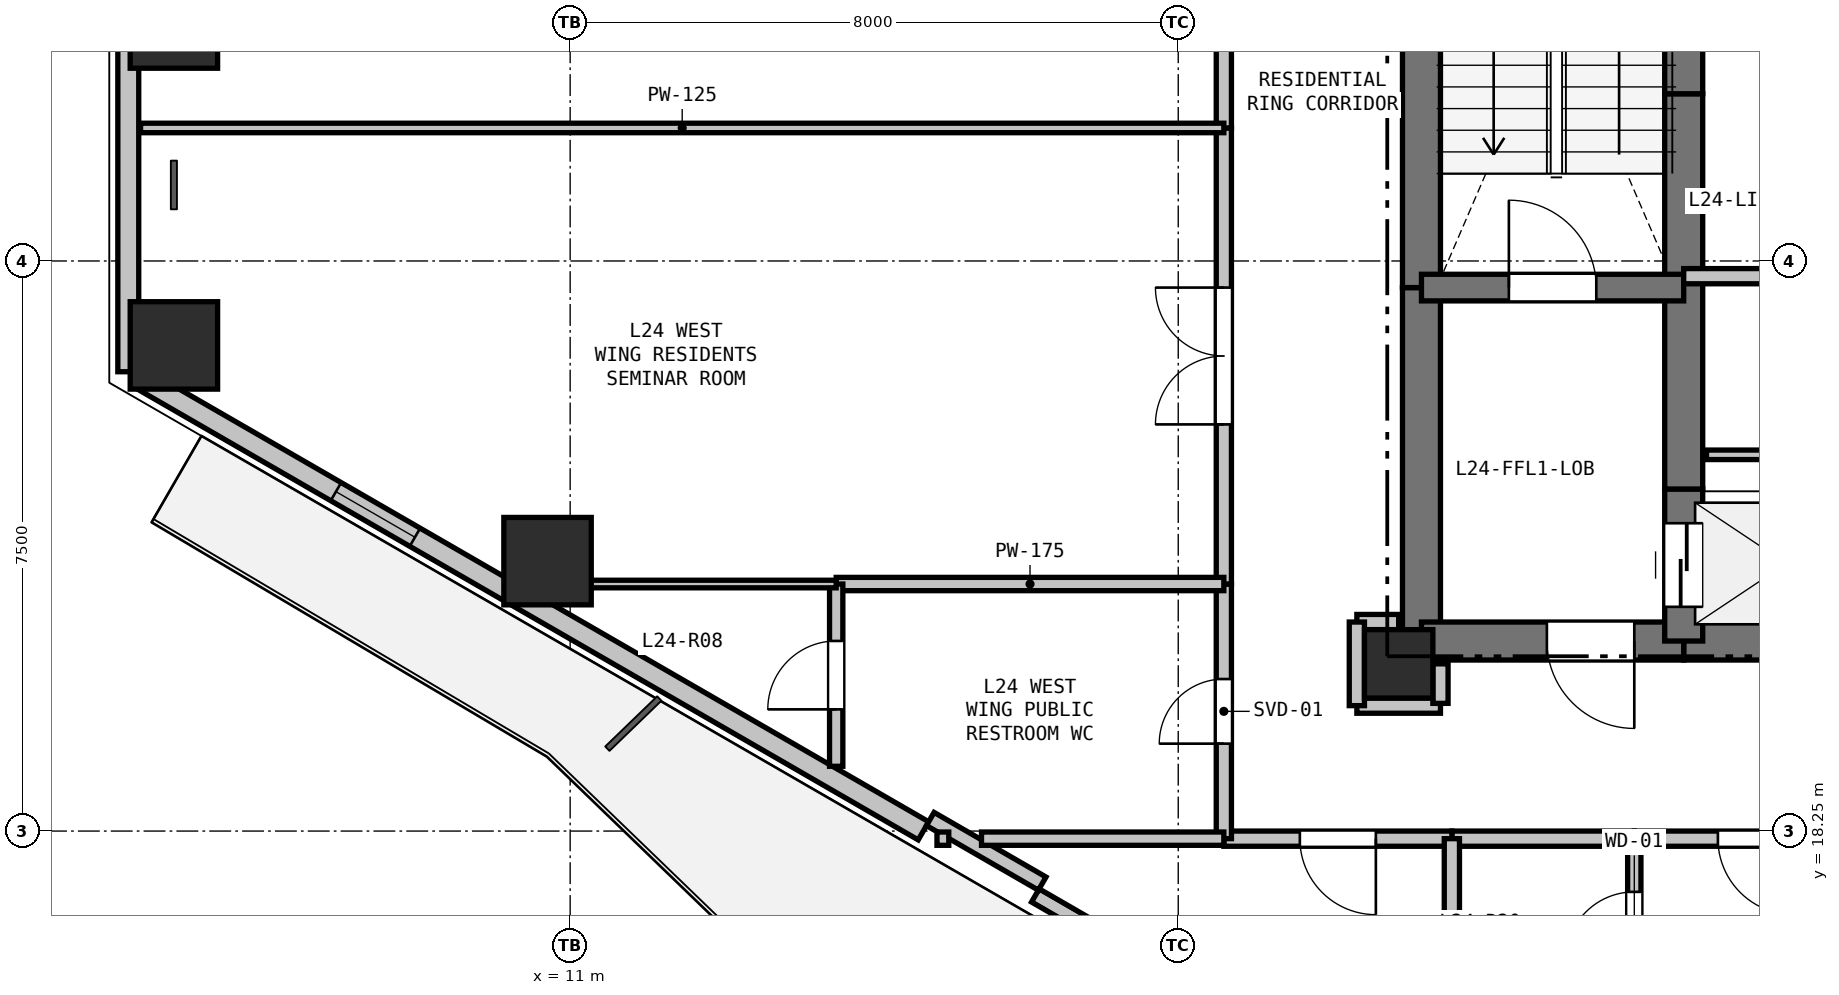
"""IFC4 building model, lengths in metres.
Left out: names, types, materials, properties, quantities, classifications, styles, units other than length and angle.
Written with IfcOpenShell. Run it as: python <this file> out.ifc"""

import sys

from ifc_helpers import new_model, si_unit, direction, frame, frame_2d, origin, origin_2d, place, context, subcontext, project, spatial, rectangle, hollow_rectangle, extrude, element, fill, save


model = new_model("IFC4")
c1 = context("Model", 3, precision=1e-05, world=origin(), true_north=direction((0.0, 1.0)))
c2 = subcontext(c1, "Body", "Model", "MODEL_VIEW")
j1 = project(units=[si_unit("LENGTHUNIT", "METRE"), si_unit("PLANEANGLEUNIT", "RADIAN")], contexts=[c1])
p1 = place(None, origin())
s1 = spatial("IfcSite", under=j1, at=p1, CompositionType="ELEMENT")
p2 = place(p1, origin())
s2 = spatial("IfcBuilding", under=s1, at=p2, CompositionType="ELEMENT")
p3 = place(p2, frame((0.0, 0.0, 90.0)))
s3 = spatial("IfcBuildingStorey", under=s2, at=p3, CompositionType="ELEMENT", Elevation=90.0)
p4 = place(p3, frame((21.9, 20.45, 0.0), z_axis=(0.0, 0.0, 1.0), x_axis=(1.0, 0.0, 0.0)))
e1 = element("IfcColumn", 1, at=p4, inside=s3, PredefinedType="COLUMN", context=c2, shape_type="SweptSolid", body=[
    extrude(rectangle(XDim=0.9, YDim=0.9, at=origin_2d()), origin(), (0.0, 0.0, 1.0), 3.3),
])
for number, where, z_axis, x_axis in (
    (2, (5.787, 28.861, 0.0), (0.0, 0.0, 1.0), (1.0, 0.0, 0.0)),
    (3, (10.702, 21.801, 0.0), (0.0, 0.0, 1.0), (1.0, 0.0, 0.0)),
    (4, (5.787, 24.639, 0.0), (0.0, 0.0, 1.0), (1.0, 0.0, 0.0)),
):
    element("IfcColumn", number, at=place(p3, frame(where, z_axis=z_axis, x_axis=x_axis)), inside=s3, PredefinedType="COLUMN", context=c2, shape_type="SweptSolid", body=[
        extrude(hollow_rectangle(XDim=1.15, YDim=1.15, WallThickness=0.032, at=origin_2d()), origin(), (0.0, 0.0, 1.0), 3.3),
    ])
p5 = place(p3, frame((5.187, 24.293, 0.0), z_axis=(0.0, 0.0, 1.0), x_axis=(0.0, 1.0, 0.0)))
e5 = element("IfcWall", 5, at=p5, inside=s3, PredefinedType="SOLIDWALL", context=c2, shape_type="SweptSolid", body=[
    extrude(rectangle(XDim=4.915, YDim=0.275, at=frame_2d((2.457, 0.0))), origin(), (0.0, 0.0, 1.0), 2.67),
])
p6 = place(p3, frame((26.845, 11.788, 0.0), z_axis=(0.0, 0.0, 1.0), x_axis=(-0.866027010039, 0.499997217876, 0.0)))
e6 = element("IfcWall", 6, at=p6, inside=s3, PredefinedType="PARAPET", context=c2, shape_type="SweptSolid", body=[
    extrude(rectangle(XDim=11.229, YDim=0.2, at=frame_2d((5.615, 0.0))), origin(), (0.0, 0.0, 1.0), 0.2),
])
p7 = place(p3, frame((15.648, 18.253, 0.0), z_axis=(0.0, 0.0, 1.0), x_axis=(-0.866023023012, 0.500004123596, 0.0)))
e7 = element("IfcWall", 7, at=p7, inside=s3, PredefinedType="SOLIDWALL", context=c2, shape_type="SweptSolid", body=[
    extrude(rectangle(XDim=11.93, YDim=0.275, at=frame_2d((5.965, 0.0))), origin(), (0.0, 0.0, 1.0), 2.67),
])
p8 = place(p7, frame((7.725, 0.0, 0.9)))
e8 = element("IfcOpeningElement", 8, at=p8, cuts=e7, PredefinedType="OPENING", context=c2, shape_type="SweptSolid", body=[
    extrude(rectangle(XDim=1.2, YDim=1.5, at=frame_2d((0.6, 0.75))), frame((0.0, 0.147, 0.0), z_axis=(0.0, -1.0, 0.0), x_axis=(1.0, 0.0, 0.0)), (0.0, 0.0, 1.0), 0.295),
])
p9 = place(p3, frame((17.21, 17.559, 0.0), z_axis=(0.0, 0.0, 1.0), x_axis=(-0.866025371046, 0.500000056704, 0.0)))
e9 = element("IfcWall", 9, at=p9, inside=s3, PredefinedType="PARAPET", context=c2, shape_type="SweptSolid", body=[
    extrude(rectangle(XDim=1.7, YDim=0.2, at=frame_2d((0.85, 0.0))), origin(), (0.0, 0.0, 1.0), 2.67),
])
p10 = place(p3, frame((22.2, 20.75, 0.0), z_axis=(0.0, 0.0, 1.0), x_axis=(0.0, 1.0, 0.0)))
e10 = element("IfcWall", 10, at=p10, inside=s3, PredefinedType="SHEAR", context=c2, shape_type="SweptSolid", body=[
    extrude(rectangle(XDim=4.65, YDim=0.5, at=frame_2d((2.325, 0.0))), origin(), (0.0, 0.0, 1.0), 3.05),
])
p11 = place(p3, frame((22.2, 25.4, 0.0), z_axis=(0.0, 0.0, 1.0), x_axis=(0.0, 1.0, 0.0)))
e11 = element("IfcWall", 11, at=p11, inside=s3, PredefinedType="SHEAR", context=c2, shape_type="SweptSolid", body=[
    extrude(rectangle(XDim=7.35, YDim=0.5, at=frame_2d((3.675, 0.0))), origin(), (0.0, 0.0, 1.0), 3.05),
])
p12 = place(p3, frame((28.35, 20.75, 0.0), z_axis=(0.0, 0.0, 1.0), x_axis=(-1.0, 0.0, 0.0)))
e12 = element("IfcWall", 12, at=p12, inside=s3, PredefinedType="SHEAR", context=c2, shape_type="SweptSolid", body=[
    extrude(rectangle(XDim=2.7, YDim=0.5, at=frame_2d((1.35, 0.0))), origin(), (0.0, 0.0, 1.0), 3.05),
])
p13 = place(p3, frame((25.65, 20.75, 0.0), z_axis=(0.0, 0.0, 1.0), x_axis=(-1.0, 0.0, 0.0)))
e13 = element("IfcWall", 13, at=p13, inside=s3, PredefinedType="SHEAR", context=c2, shape_type="SweptSolid", body=[
    extrude(rectangle(XDim=3.45, YDim=0.5, at=frame_2d((1.725, 0.0))), origin(), (0.0, 0.0, 1.0), 3.05),
])
p14 = place(p13, frame((0.65, 0.0, 0.0)))
e14 = element("IfcOpeningElement", 14, at=p14, cuts=e13, PredefinedType="OPENING", context=c2, shape_type="SweptSolid", body=[
    extrude(rectangle(XDim=1.15, YDim=2.15, at=frame_2d((0.575, 1.075))), frame((0.0, 0.26, 0.0), z_axis=(0.0, -1.0, 0.0), x_axis=(1.0, 0.0, 0.0)), (0.0, 0.0, 1.0), 0.52),
])
p15 = place(p3, frame((25.65, 20.75, 0.0), z_axis=(0.0, 0.0, 1.0), x_axis=(0.0, 1.0, 0.0)))
e15 = element("IfcWall", 15, at=p15, inside=s3, PredefinedType="SHEAR", context=c2, shape_type="SweptSolid", body=[
    extrude(rectangle(XDim=2.0, YDim=0.5, at=frame_2d((1.0, 0.0))), origin(), (0.0, 0.0, 1.0), 3.05),
])
p16 = place(p15, frame((0.45, 0.0, 0.0)))
e16 = element("IfcOpeningElement", 16, at=p16, cuts=e15, PredefinedType="OPENING", context=c2, shape_type="SweptSolid", body=[
    extrude(rectangle(XDim=1.1, YDim=2.15, at=frame_2d((0.55, 1.075))), frame((0.0, 0.26, 0.0), z_axis=(0.0, -1.0, 0.0), x_axis=(1.0, 0.0, 0.0)), (0.0, 0.0, 1.0), 0.52),
])
p17 = place(p3, frame((25.65, 22.75, 0.0), z_axis=(0.0, 0.0, 1.0), x_axis=(0.0, 1.0, 0.0)))
e17 = element("IfcWall", 17, at=p17, inside=s3, PredefinedType="SHEAR", context=c2, shape_type="SweptSolid", body=[
    extrude(rectangle(XDim=2.8, YDim=0.5, at=frame_2d((1.4, 0.0))), origin(), (0.0, 0.0, 1.0), 3.05),
])
p18 = place(p3, frame((25.65, 25.55, 0.0), z_axis=(0.0, 0.0, 1.0), x_axis=(0.0, 1.0, 0.0)))
e18 = element("IfcWall", 18, at=p18, inside=s3, PredefinedType="SHEAR", context=c2, shape_type="SweptSolid", body=[
    extrude(rectangle(XDim=2.4, YDim=0.5, at=frame_2d((1.2, 0.0))), origin(), (0.0, 0.0, 1.0), 3.05),
])
p19 = place(p3, frame((25.65, 27.95, 0.0), z_axis=(0.0, 0.0, 1.0), x_axis=(0.0, 1.0, 0.0)))
e19 = element("IfcWall", 19, at=p19, inside=s3, PredefinedType="SHEAR", context=c2, shape_type="SweptSolid", body=[
    extrude(rectangle(XDim=4.8, YDim=0.5, at=frame_2d((2.4, 0.0))), origin(), (0.0, 0.0, 1.0), 3.05),
])
p20 = place(p3, frame((22.2, 25.4, 0.0), z_axis=(0.0, 0.0, 1.0), x_axis=(1.0, 0.0, 0.0)))
e20 = element("IfcWall", 20, at=p20, inside=s3, PredefinedType="SHEAR", context=c2, shape_type="SweptSolid", body=[
    extrude(rectangle(XDim=3.45, YDim=0.35, at=frame_2d((1.725, 0.0))), origin(), (0.0, 0.0, 1.0), 3.05),
])
p21 = place(p20, frame((1.15, 0.0, 0.0)))
e21 = element("IfcOpeningElement", 21, at=p21, cuts=e20, PredefinedType="OPENING", context=c2, shape_type="SweptSolid", body=[
    extrude(rectangle(XDim=1.15, YDim=2.15, at=frame_2d((0.575, 1.075))), frame((0.0, 0.185, 0.0), z_axis=(0.0, -1.0, 0.0), x_axis=(1.0, 0.0, 0.0)), (0.0, 0.0, 1.0), 0.37),
])
p22 = place(p3, frame((25.65, 25.55, 0.0), z_axis=(0.0, 0.0, 1.0), x_axis=(1.0, 0.0, 0.0)))
e22 = element("IfcWall", 22, at=p22, inside=s3, PredefinedType="PARTITIONING", context=c2, shape_type="SweptSolid", body=[
    extrude(rectangle(XDim=4.95, YDim=0.2, at=frame_2d((2.475, 0.0))), origin(), (0.0, 0.0, 1.0), 3.05),
])
p23 = place(p3, frame((25.95, 23.2, 0.0), z_axis=(0.0, 0.0, 1.0), x_axis=(1.0, 0.0, 0.0)))
e23 = element("IfcWall", 23, at=p23, inside=s3, PredefinedType="PARTITIONING", context=c2, shape_type="SweptSolid", body=[
    extrude(rectangle(XDim=1.35, YDim=0.125, at=frame_2d((0.675, 0.0))), origin(), (0.0, 0.0, 1.0), 3.05),
])
p24 = place(p3, frame((21.35, 19.9, 0.0), z_axis=(0.0, 0.0, 1.0), x_axis=(1.0, 0.0, 0.0)))
e24 = element("IfcWall", 24, at=p24, inside=s3, PredefinedType="PARTITIONING", context=c2, shape_type="SweptSolid", body=[
    extrude(rectangle(XDim=1.1, YDim=0.2, at=frame_2d((0.55, 0.0))), origin(), (0.0, 0.0, 1.0), 2.423),
])
p25 = place(p3, frame((22.45, 19.93, 0.0), z_axis=(0.0, 0.0, 1.0), x_axis=(0.0, 1.0, 0.0)))
e25 = element("IfcWall", 25, at=p25, inside=s3, PredefinedType="PARTITIONING", context=c2, shape_type="SweptSolid", body=[
    extrude(rectangle(XDim=0.52, YDim=0.2, at=frame_2d((0.26, 0.0))), origin(), (0.0, 0.0, 1.0), 2.423),
])
p26 = place(p3, frame((28.2, 18.15, 0.0), z_axis=(0.0, 0.0, 1.0), x_axis=(-1.0, 0.0, 0.0)))
e26 = element("IfcWall", 26, at=p26, inside=s3, PredefinedType="PARTITIONING", context=c2, shape_type="SweptSolid", body=[
    extrude(rectangle(XDim=3.2, YDim=0.2, at=frame_2d((1.6, 0.0))), origin(), (0.0, 0.0, 1.0), 3.05),
])
p27 = place(p26, frame((1.1, 0.0, 0.0)))
e27 = element("IfcOpeningElement", 27, at=p27, cuts=e26, PredefinedType="OPENING", context=c2, shape_type="SweptSolid", body=[
    extrude(rectangle(XDim=1.0, YDim=2.15, at=frame_2d((0.5, 1.075))), frame((0.0, 0.11, 0.0), z_axis=(0.0, -1.0, 0.0), x_axis=(1.0, 0.0, 0.0)), (0.0, 0.0, 1.0), 0.22),
])
p28 = place(p3, frame((25.0, 18.15, 0.0), z_axis=(0.0, 0.0, 1.0), x_axis=(-1.0, 0.0, 0.0)))
e28 = element("IfcWall", 28, at=p28, inside=s3, PredefinedType="PARTITIONING", context=c2, shape_type="SweptSolid", body=[
    extrude(rectangle(XDim=2.4, YDim=0.2, at=frame_2d((1.2, 0.0))), origin(), (0.0, 0.0, 1.0), 2.423),
])
p29 = place(p3, frame((22.6, 18.15, 0.0), z_axis=(0.0, 0.0, 1.0), x_axis=(-1.0, 0.0, 0.0)))
e29 = element("IfcWall", 29, at=p29, inside=s3, PredefinedType="PARTITIONING", context=c2, shape_type="SweptSolid", body=[
    extrude(rectangle(XDim=3.0, YDim=0.2, at=frame_2d((1.5, 0.0))), origin(), (0.0, 0.0, 1.0), 3.05),
])
p30 = place(p29, frame((1.0, 0.0, 0.0)))
e30 = element("IfcOpeningElement", 30, at=p30, cuts=e29, PredefinedType="OPENING", context=c2, shape_type="SweptSolid", body=[
    extrude(rectangle(XDim=1.0, YDim=2.15, at=frame_2d((0.5, 1.075))), frame((0.0, 0.11, 0.0), z_axis=(0.0, -1.0, 0.0), x_axis=(1.0, 0.0, 0.0)), (0.0, 0.0, 1.0), 0.22),
])
p31 = place(p3, frame((19.6, 18.15, 0.0), z_axis=(0.0, 0.0, 1.0), x_axis=(0.0, 1.0, 0.0)))
e31 = element("IfcWall", 31, at=p31, inside=s3, PredefinedType="PARTITIONING", context=c2, shape_type="SweptSolid", body=[
    extrude(rectangle(XDim=3.35, YDim=0.2, at=frame_2d((1.675, 0.0))), origin(), (0.0, 0.0, 1.0), 2.423),
])
p32 = place(p31, frame((1.25, 0.0, 0.0)))
e32 = element("IfcOpeningElement", 32, at=p32, cuts=e31, PredefinedType="OPENING", context=c2, shape_type="SweptSolid", body=[
    extrude(rectangle(XDim=0.85, YDim=2.1, at=frame_2d((0.425, 1.05))), frame((0.0, 0.11, 0.0), z_axis=(0.0, -1.0, 0.0), x_axis=(1.0, 0.0, 0.0)), (0.0, 0.0, 1.0), 0.22),
])
p33 = place(p3, frame((19.6, 21.5, 0.0), z_axis=(0.0, 0.0, 1.0), x_axis=(0.0, 1.0, 0.0)))
e33 = element("IfcWall", 33, at=p33, inside=s3, PredefinedType="PARTITIONING", context=c2, shape_type="SweptSolid", body=[
    extrude(rectangle(XDim=6.0, YDim=0.2, at=frame_2d((3.0, 0.0))), origin(), (0.0, 0.0, 1.0), 3.05),
])
p34 = place(p33, frame((2.1, 0.0, 0.0)))
e34 = element("IfcOpeningElement", 34, at=p34, cuts=e33, PredefinedType="OPENING", context=c2, shape_type="SweptSolid", body=[
    extrude(rectangle(XDim=1.8, YDim=2.2, at=frame_2d((0.9, 1.1))), frame((0.0, 0.11, 0.0), z_axis=(0.0, -1.0, 0.0), x_axis=(1.0, 0.0, 0.0)), (0.0, 0.0, 1.0), 0.22),
])
p35 = place(p3, frame((19.6, 27.5, 0.0), z_axis=(0.0, 0.0, 1.0), x_axis=(0.0, 1.0, 0.0)))
e35 = element("IfcWall", 35, at=p35, inside=s3, PredefinedType="PARTITIONING", context=c2, shape_type="SweptSolid", body=[
    extrude(rectangle(XDim=7.85, YDim=0.2, at=frame_2d((3.925, 0.0))), origin(), (0.0, 0.0, 1.0), 2.423),
])
p36 = place(p35, frame((3.025, 0.0, 0.0)))
e36 = element("IfcOpeningElement", 36, at=p36, cuts=e35, PredefinedType="OPENING", context=c2, shape_type="SweptSolid", body=[
    extrude(rectangle(XDim=1.8, YDim=2.2, at=frame_2d((0.9, 1.1))), frame((0.0, 0.11, 0.0), z_axis=(0.0, -1.0, 0.0), x_axis=(1.0, 0.0, 0.0)), (0.0, 0.0, 1.0), 0.22),
])
p37 = place(p3, frame((21.9, 21.0, 0.0), z_axis=(0.0, 0.0, 1.0), x_axis=(-1.0, 0.0, 0.0)))
e37 = element("IfcWall", 37, at=p37, inside=s3, PredefinedType="PARTITIONING", context=c2, shape_type="SweptSolid", body=[
    extrude(rectangle(XDim=0.55, YDim=0.2, at=frame_2d((0.275, 0.0))), origin(), (0.0, 0.0, 1.0), 2.498),
])
p38 = place(p3, frame((21.35, 21.0, 0.0), z_axis=(0.0, 0.0, 1.0), x_axis=(0.0, -1.0, 0.0)))
e38 = element("IfcWall", 38, at=p38, inside=s3, PredefinedType="PARTITIONING", context=c2, shape_type="SweptSolid", body=[
    extrude(rectangle(XDim=1.1, YDim=0.2, at=frame_2d((0.55, 0.0))), origin(), (0.0, 0.0, 1.0), 2.423),
])
p39 = place(p3, frame((25.0, 15.85, 0.0), z_axis=(0.0, 0.0, 1.0), x_axis=(0.0, 1.0, 0.0)))
e39 = element("IfcWall", 39, at=p39, inside=s3, PredefinedType="PLUMBINGWALL", context=c2, shape_type="SweptSolid", body=[
    extrude(rectangle(XDim=2.3, YDim=0.175, at=frame_2d((1.15, 0.0))), origin(), (0.0, 0.0, 1.0), 2.423),
])
p40 = place(p39, frame((0.7, 0.0, 0.0)))
e40 = element("IfcOpeningElement", 40, at=p40, cuts=e39, PredefinedType="OPENING", context=c2, shape_type="SweptSolid", body=[
    extrude(rectangle(XDim=0.9, YDim=2.1, at=frame_2d((0.45, 1.05))), frame((0.0, 0.097, 0.0), z_axis=(0.0, -1.0, 0.0), x_axis=(1.0, 0.0, 0.0)), (0.0, 0.0, 1.0), 0.195),
])
p41 = place(p3, frame((14.5, 21.5, 0.0), z_axis=(0.0, 0.0, 1.0), x_axis=(1.0, 0.0, 0.0)))
e41 = element("IfcWall", 41, at=p41, inside=s3, PredefinedType="PLUMBINGWALL", context=c2, shape_type="SweptSolid", body=[
    extrude(rectangle(XDim=5.1, YDim=0.175, at=frame_2d((2.55, 0.0))), origin(), (0.0, 0.0, 1.0), 2.423),
])
p42 = place(p3, frame((19.6, 18.15, 0.0), z_axis=(0.0, 0.0, 1.0), x_axis=(-1.0, 0.0, 0.0)))
e42 = element("IfcWall", 42, at=p42, inside=s3, PredefinedType="PLUMBINGWALL", context=c2, shape_type="SweptSolid", body=[
    extrude(rectangle(XDim=3.188, YDim=0.175, at=frame_2d((1.594, 0.0))), origin(), (0.0, 0.0, 1.0), 2.365),
])
p43 = place(p3, frame((15.981, 18.15, 0.0), z_axis=(0.0, 0.0, 1.0), x_axis=(-1.0, 0.0, 0.0)))
e43 = element("IfcWall", 43, at=p43, inside=s3, PredefinedType="PLUMBINGWALL", context=c2, shape_type="SweptSolid", body=[
    extrude(rectangle(XDim=0.155, YDim=0.175, at=frame_2d((0.078, 0.0))), origin(), (0.0, 0.0, 1.0), 3.05),
])
p44 = place(p3, frame((14.5, 19.102, 0.0), z_axis=(0.0, 0.0, 1.0), x_axis=(0.0, 1.0, 0.0)))
e44 = element("IfcWall", 44, at=p44, inside=s3, PredefinedType="PLUMBINGWALL", context=c2, shape_type="SweptSolid", body=[
    extrude(rectangle(XDim=2.398, YDim=0.175, at=frame_2d((1.199, 0.0))), origin(), (0.0, 0.0, 1.0), 2.365),
])
p45 = place(p44, frame((0.749, 0.0, 0.0)))
e45 = element("IfcOpeningElement", 45, at=p45, cuts=e44, PredefinedType="OPENING", context=c2, shape_type="SweptSolid", body=[
    extrude(rectangle(XDim=0.9, YDim=2.1, at=frame_2d((0.45, 1.05))), frame((0.0, 0.097, 0.0), z_axis=(0.0, -1.0, 0.0), x_axis=(1.0, 0.0, 0.0)), (0.0, 0.0, 1.0), 0.195),
])
p46 = place(p3, frame((22.6, 15.85, 0.0), z_axis=(0.0, 0.0, 1.0), x_axis=(0.0, 1.0, 0.0)))
e46 = element("IfcWall", 46, at=p46, inside=s3, PredefinedType="PARTITIONING", context=c2, shape_type="SweptSolid", body=[
    extrude(rectangle(XDim=2.3, YDim=0.2, at=frame_2d((1.15, 0.0))), origin(), (0.0, 0.0, 1.0), 3.05),
])
p47 = place(p3, frame((19.6, 27.5, 0.0), z_axis=(0.0, 0.0, 1.0), x_axis=(-1.0, 0.0, 0.0)))
e47 = element("IfcWall", 47, at=p47, inside=s3, PredefinedType="PARTITIONING", context=c2, shape_type="SweptSolid", body=[
    extrude(rectangle(XDim=14.252, YDim=0.125, at=frame_2d((7.126, 0.0))), origin(), (0.0, 0.0, 1.0), 2.66),
])
p48 = place(p3, frame((14.5, 21.5, 0.0), z_axis=(0.0, 0.0, 1.0), x_axis=(-1.0, 0.0, 0.0)))
e48 = element("IfcWall", 48, at=p48, inside=s3, PredefinedType="PARTITIONING", context=c2, shape_type="SweptSolid", body=[
    extrude(rectangle(XDim=4.182, YDim=0.1, at=frame_2d((2.091, 0.0))), origin(), (0.0, 0.0, 1.0), 2.365),
])
p49 = place(p8, origin())
e49 = element("IfcWindow", 49, at=p49, inside=s3, PartitioningType="SINGLE_PANEL", PredefinedType="WINDOW", context=c2, shape_type="SweptSolid", body=[
    extrude(rectangle(XDim=1.2, YDim=1.5, at=frame_2d((0.6, 0.75))), frame((0.0, 0.03, 0.0), z_axis=(0.0, -1.0, 0.0), x_axis=(1.0, 0.0, 0.0)), (0.0, 0.0, 1.0), 0.06),
])
fill(e8, e49)
p50 = place(p16, origin())
e50 = element("IfcDoor", 50, at=p50, inside=s3, OperationType="SLIDING_TO_LEFT", PredefinedType="DOOR", context=c2, shape_type="SweptSolid", body=[
    extrude(rectangle(XDim=1.1, YDim=2.15, at=frame_2d((0.55, 1.075))), frame((0.0, 0.025, 0.0), z_axis=(0.0, -1.0, 0.0), x_axis=(1.0, 0.0, 0.0)), (0.0, 0.0, 1.0), 0.05),
])
fill(e16, e50)
p51 = place(p21, origin())
e51 = element("IfcDoor", 51, at=p51, inside=s3, OperationType="SINGLE_SWING_LEFT", PredefinedType="DOOR", context=c2, shape_type="SweptSolid", body=[
    extrude(rectangle(XDim=1.15, YDim=2.15, at=frame_2d((0.575, 1.075))), frame((0.0, 0.025, 0.0), z_axis=(0.0, -1.0, 0.0), x_axis=(1.0, 0.0, 0.0)), (0.0, 0.0, 1.0), 0.05),
])
fill(e21, e51)
p52 = place(p14, origin())
e52 = element("IfcDoor", 52, at=p52, inside=s3, OperationType="SINGLE_SWING_LEFT", PredefinedType="DOOR", context=c2, shape_type="SweptSolid", body=[
    extrude(rectangle(XDim=1.15, YDim=2.15, at=frame_2d((0.575, 1.075))), frame((0.0, 0.025, 0.0), z_axis=(0.0, -1.0, 0.0), x_axis=(1.0, 0.0, 0.0)), (0.0, 0.0, 1.0), 0.05),
])
fill(e14, e52)
p53 = place(p27, origin())
e53 = element("IfcDoor", 53, at=p53, inside=s3, OperationType="SINGLE_SWING_LEFT", PredefinedType="DOOR", context=c2, shape_type="SweptSolid", body=[
    extrude(rectangle(XDim=1.0, YDim=2.15, at=frame_2d((0.5, 1.075))), frame((0.0, 0.025, 0.0), z_axis=(0.0, -1.0, 0.0), x_axis=(1.0, 0.0, 0.0)), (0.0, 0.0, 1.0), 0.05),
])
fill(e27, e53)
p54 = place(p32, origin())
e54 = element("IfcDoor", 54, at=p54, inside=s3, OperationType="SINGLE_SWING_LEFT", PredefinedType="DOOR", context=c2, shape_type="SweptSolid", body=[
    extrude(rectangle(XDim=0.85, YDim=2.1, at=frame_2d((0.425, 1.05))), frame((0.0, 0.025, 0.0), z_axis=(0.0, -1.0, 0.0), x_axis=(1.0, 0.0, 0.0)), (0.0, 0.0, 1.0), 0.05),
])
fill(e32, e54)
p55 = place(p30, origin())
e55 = element("IfcDoor", 55, at=p55, inside=s3, OperationType="SINGLE_SWING_LEFT", PredefinedType="DOOR", context=c2, shape_type="SweptSolid", body=[
    extrude(rectangle(XDim=1.0, YDim=2.15, at=frame_2d((0.5, 1.075))), frame((0.0, 0.025, 0.0), z_axis=(0.0, -1.0, 0.0), x_axis=(1.0, 0.0, 0.0)), (0.0, 0.0, 1.0), 0.05),
])
fill(e30, e55)
p56 = place(p34, origin())
e56 = element("IfcDoor", 56, at=p56, inside=s3, OperationType="DOUBLE_DOOR_SINGLE_SWING", PredefinedType="DOOR", context=c2, shape_type="SweptSolid", body=[
    extrude(rectangle(XDim=1.8, YDim=2.2, at=frame_2d((0.9, 1.1))), frame((0.0, 0.025, 0.0), z_axis=(0.0, -1.0, 0.0), x_axis=(1.0, 0.0, 0.0)), (0.0, 0.0, 1.0), 0.05),
])
fill(e34, e56)
p57 = place(p40, origin())
e57 = element("IfcDoor", 57, at=p57, inside=s3, OperationType="SINGLE_SWING_LEFT", PredefinedType="DOOR", context=c2, shape_type="SweptSolid", body=[
    extrude(rectangle(XDim=0.9, YDim=2.1, at=frame_2d((0.45, 1.05))), frame((0.0, 0.025, 0.0), z_axis=(0.0, -1.0, 0.0), x_axis=(1.0, 0.0, 0.0)), (0.0, 0.0, 1.0), 0.05),
])
fill(e40, e57)
p58 = place(p45, origin())
e58 = element("IfcDoor", 58, at=p58, inside=s3, OperationType="SINGLE_SWING_LEFT", PredefinedType="DOOR", context=c2, shape_type="SweptSolid", body=[
    extrude(rectangle(XDim=0.9, YDim=2.1, at=frame_2d((0.45, 1.05))), frame((0.0, 0.025, 0.0), z_axis=(0.0, -1.0, 0.0), x_axis=(1.0, 0.0, 0.0)), (0.0, 0.0, 1.0), 0.05),
])
fill(e45, e58)
save(model, sys.argv[1])
